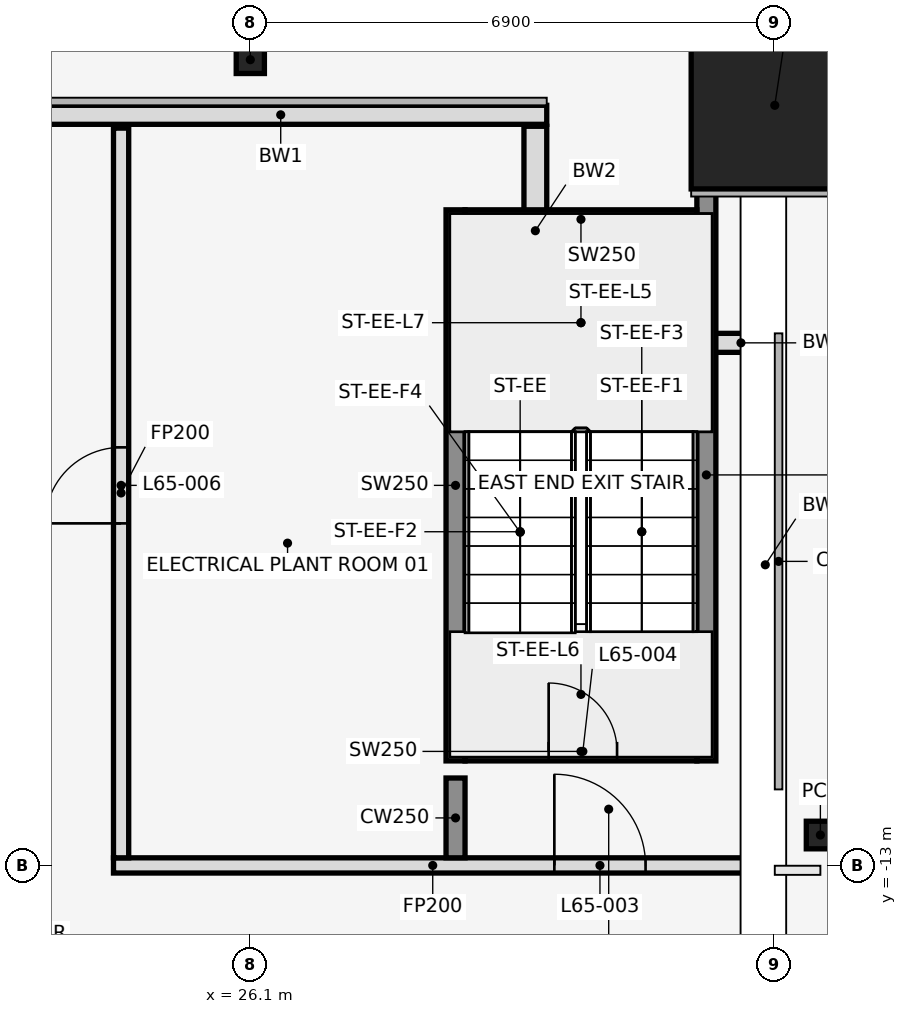
"""IFC4 building model, lengths in metres.
Left out: names, types, materials, properties, quantities, classifications, styles, units other than length and angle.
Written with IfcOpenShell. Run it as: python <this file> out.ifc"""

import sys

from ifc_helpers import new_model, si_unit, direction, frame, frame_2d, origin, origin_2d, place, context, subcontext, project, spatial, rectangle, hollow_rectangle, i_section, extrude, element, fill, save


model = new_model("IFC4")
c1 = context("Model", 3, precision=1e-05, world=origin(), true_north=direction((0.0, 1.0)))
c2 = subcontext(c1, "Body", "Model", "MODEL_VIEW")
j1 = project(units=[si_unit("LENGTHUNIT", "METRE"), si_unit("PLANEANGLEUNIT", "RADIAN")], contexts=[c1])
p1 = place(None, origin())
s1 = spatial("IfcSite", under=j1, at=p1, CompositionType="ELEMENT")
p2 = place(p1, origin())
s2 = spatial("IfcBuilding", under=s1, at=p2, CompositionType="ELEMENT")
p3 = place(p2, frame((0.0, 0.0, 287.6)))
s3 = spatial("IfcBuildingStorey", under=s2, at=p3, CompositionType="ELEMENT", Elevation=287.6)
p4 = place(p3, frame((26.1, -2.4, 0.0), z_axis=(0.0, 0.0, 1.0), x_axis=(1.0, 0.0, 0.0)))
e1 = element("IfcColumn", 1, at=p4, inside=s3, PredefinedType="COLUMN", context=c2, shape_type="SweptSolid", body=[
    extrude(i_section(OverallWidth=0.371, OverallDepth=0.363, WebThickness=0.013, FlangeThickness=0.022, at=origin_2d()), origin(), (0.0, 0.0, 1.0), 5.4),
])
p5 = place(p3, frame((33.0, -3.0, 0.0), z_axis=(0.0, 0.0, 1.0), x_axis=(1.0, 0.0, 0.0)))
e2 = element("IfcColumn", 2, at=p5, inside=s3, PredefinedType="COLUMN", context=c2, shape_type="SweptSolid", body=[
    extrude(hollow_rectangle(XDim=2.2, YDim=2.2, WallThickness=0.06, at=origin_2d()), origin(), (0.0, 0.0, 1.0), 5.4),
])
p6 = place(p3, frame((33.6, -12.6, 0.0), z_axis=(0.0, 0.0, 1.0), x_axis=(1.0, 0.0, 0.0)))
e3 = element("IfcColumn", 3, at=p6, inside=s3, PredefinedType="COLUMN", context=c2, shape_type="SweptSolid", body=[
    extrude(i_section(OverallWidth=0.371, OverallDepth=0.363, WebThickness=0.013, FlangeThickness=0.022, at=origin_2d()), origin(), (0.0, 0.0, 1.0), 5.4),
])
p7 = place(p3, frame((32.85, -21.328, 0.0), z_axis=(0.0, 0.0, 1.0), x_axis=(0.0, 1.0, 0.0)))
e4 = element("IfcWall", 4, at=p7, inside=s3, PredefinedType="STANDARD", context=c2, shape_type="SweptSolid", body=[
    extrude(rectangle(XDim=9.328, YDim=0.3, at=frame_2d((4.664, 0.0))), origin(), (0.0, 0.0, 1.0), 4.338),
])
p8 = place(p3, frame((29.85, -6.024, 0.0), z_axis=(0.0, 0.0, 1.0), x_axis=(0.0, 1.0, 0.0)))
e5 = element("IfcWall", 5, at=p8, inside=s3, PredefinedType="STANDARD", context=c2, shape_type="SweptSolid", body=[
    extrude(rectangle(XDim=2.748, YDim=0.3, at=frame_2d((1.374, 0.0))), origin(), (0.0, 0.0, 1.0), 5.25),
])
p9 = place(p3, frame((32.875, -12.09, 0.0), z_axis=(0.0, 0.0, 1.0), x_axis=(0.0, 1.0, 0.0)))
e6 = element("IfcWall", 6, at=p9, inside=s3, PredefinedType="STANDARD", context=c2, shape_type="SweptSolid", body=[
    extrude(rectangle(XDim=6.09, YDim=0.25, at=frame_2d((3.045, 0.0))), origin(), (0.0, 0.0, 1.0), 5.25),
])
p10 = place(p3, frame((33.0, -6.125, 0.0), z_axis=(0.0, 0.0, 1.0), x_axis=(-1.0, 0.0, 0.0)))
e7 = element("IfcWall", 7, at=p10, inside=s3, PredefinedType="STANDARD", context=c2, shape_type="SweptSolid", body=[
    extrude(rectangle(XDim=0.89, YDim=0.25, at=frame_2d((0.445, 0.0))), origin(), (0.0, 0.0, 1.0), 5.25),
])
p11 = place(p3, frame((30.0, -3.125, 0.0), z_axis=(0.0, 0.0, 1.0), x_axis=(-1.0, 0.0, 0.0)))
e8 = element("IfcWall", 8, at=p11, inside=s3, PredefinedType="STANDARD", context=c2, shape_type="SweptSolid", body=[
    extrude(rectangle(XDim=7.0, YDim=0.25, at=frame_2d((3.5, 0.0))), origin(), (0.0, 0.0, 1.0), 5.25),
])
p12 = place(p3, frame((28.8, -11.625, 0.0), z_axis=(0.0, 0.0, 1.0), x_axis=(0.0, 1.0, 0.0)))
e9 = element("IfcWall", 9, at=p12, inside=s3, PredefinedType="SHEAR", context=c2, shape_type="SweptSolid", body=[
    extrude(rectangle(XDim=7.25, YDim=0.25, at=frame_2d((3.625, 0.0))), origin(), (0.0, 0.0, 1.0), 5.4),
])
p13 = place(p3, frame((32.1, -11.625, 0.0), z_axis=(0.0, 0.0, 1.0), x_axis=(0.0, 1.0, 0.0)))
e10 = element("IfcWall", 10, at=p13, inside=s3, PredefinedType="SHEAR", context=c2, shape_type="SweptSolid", body=[
    extrude(rectangle(XDim=7.525, YDim=0.25, at=frame_2d((3.762, 0.0))), origin(), (0.0, 0.0, 1.0), 5.4),
])
p14 = place(p3, frame((28.925, -11.5, 0.0), z_axis=(0.0, 0.0, 1.0), x_axis=(1.0, 0.0, 0.0)))
e11 = element("IfcWall", 11, at=p14, inside=s3, PredefinedType="SHEAR", context=c2, shape_type="SweptSolid", body=[
    extrude(rectangle(XDim=3.05, YDim=0.25, at=frame_2d((1.525, 0.0))), origin(), (0.0, 0.0, 1.0), 5.4),
])
p15 = place(p14, frame((1.1, 0.0, 0.0)))
e12 = element("IfcOpeningElement", 12, at=p15, cuts=e11, PredefinedType="OPENING", context=c2, shape_type="SweptSolid", body=[
    extrude(rectangle(XDim=0.9, YDim=2.1, at=frame_2d((0.45, 1.05))), frame((0.0, 0.137, 0.0), z_axis=(0.0, -1.0, 0.0), x_axis=(1.0, 0.0, 0.0)), (0.0, 0.0, 1.0), 0.274),
])
p16 = place(p3, frame((28.925, -4.5, 0.0), z_axis=(0.0, 0.0, 1.0), x_axis=(1.0, 0.0, 0.0)))
e13 = element("IfcWall", 13, at=p16, inside=s3, PredefinedType="SHEAR", context=c2, shape_type="SweptSolid", body=[
    extrude(rectangle(XDim=3.05, YDim=0.25, at=frame_2d((1.525, 0.0))), origin(), (0.0, 0.0, 1.0), 5.4),
])
p17 = place(p3, frame((24.3, -13.0, 0.0), z_axis=(0.0, 0.0, 1.0), x_axis=(1.0, 0.0, 0.0)))
e14 = element("IfcWall", 14, at=p17, inside=s3, PredefinedType="PARTITIONING", context=c2, shape_type="SweptSolid", body=[
    extrude(rectangle(XDim=8.4, YDim=0.2, at=frame_2d((4.2, 0.0))), origin(), (0.0, 0.0, 1.0), 4.318),
])
p18 = place(p17, frame((5.8, 0.0, 0.0)))
e15 = element("IfcOpeningElement", 15, at=p18, cuts=e14, PredefinedType="OPENING", context=c2, shape_type="SweptSolid", body=[
    extrude(rectangle(XDim=1.2, YDim=2.1, at=frame_2d((0.6, 1.05))), frame((0.0, 0.112, 0.0), z_axis=(0.0, -1.0, 0.0), x_axis=(1.0, 0.0, 0.0)), (0.0, 0.0, 1.0), 0.224),
])
p19 = place(p3, frame((24.4, -12.9, 0.0), z_axis=(0.0, 0.0, 1.0), x_axis=(0.0, 1.0, 0.0)))
e16 = element("IfcWall", 16, at=p19, inside=s3, PredefinedType="PARTITIONING", context=c2, shape_type="SweptSolid", body=[
    extrude(rectangle(XDim=9.6, YDim=0.2, at=frame_2d((4.8, 0.0))), origin(), (0.0, 0.0, 1.0), 4.318),
])
p20 = place(p19, frame((4.4, 0.0, 0.0)))
e17 = element("IfcOpeningElement", 17, at=p20, cuts=e16, PredefinedType="OPENING", context=c2, shape_type="SweptSolid", body=[
    extrude(rectangle(XDim=1.0, YDim=2.1, at=frame_2d((0.5, 1.05))), frame((0.0, 0.112, 0.0), z_axis=(0.0, -1.0, 0.0), x_axis=(1.0, 0.0, 0.0)), (0.0, 0.0, 1.0), 0.224),
])
p21 = place(p3, frame((28.8, -12.9, 0.0), z_axis=(0.0, 0.0, 1.0), x_axis=(0.0, 1.0, 0.0)))
e18 = element("IfcWall", 18, at=p21, inside=s3, PredefinedType="SHEAR", context=c2, shape_type="SweptSolid", body=[
    extrude(rectangle(XDim=1.05, YDim=0.25, at=frame_2d((0.525, 0.0))), origin(), (0.0, 0.0, 1.0), 5.4),
])
p22 = place(p18, origin())
e19 = element("IfcDoor", 19, at=p22, inside=s3, OperationType="SINGLE_SWING_RIGHT", PredefinedType="DOOR", context=c2, shape_type="SweptSolid", body=[
    extrude(rectangle(XDim=1.2, YDim=2.1, at=frame_2d((0.6, 1.05))), frame((0.0, 0.025, 0.0), z_axis=(0.0, -1.0, 0.0), x_axis=(1.0, 0.0, 0.0)), (0.0, 0.0, 1.0), 0.05),
])
fill(e15, e19)
p23 = place(p15, origin())
e20 = element("IfcDoor", 20, at=p23, inside=s3, OperationType="SINGLE_SWING_LEFT", PredefinedType="DOOR", context=c2, shape_type="SweptSolid", body=[
    extrude(rectangle(XDim=0.9, YDim=2.1, at=frame_2d((0.45, 1.05))), frame((0.0, 0.025, 0.0), z_axis=(0.0, -1.0, 0.0), x_axis=(1.0, 0.0, 0.0)), (0.0, 0.0, 1.0), 0.05),
])
fill(e12, e20)
p24 = place(p20, frame((1.0, 0.0, 0.0), z_axis=(0.0, 0.0, 1.0), x_axis=(-1.0, 0.0, 0.0)))
e21 = element("IfcDoor", 21, at=p24, inside=s3, OperationType="SINGLE_SWING_RIGHT", PredefinedType="DOOR", context=c2, shape_type="SweptSolid", body=[
    extrude(rectangle(XDim=1.0, YDim=2.1, at=frame_2d((0.5, 1.05))), frame((0.0, 0.025, 0.0), z_axis=(0.0, -1.0, 0.0), x_axis=(1.0, 0.0, 0.0)), (0.0, 0.0, 1.0), 0.05),
])
fill(e17, e21)
save(model, sys.argv[1])
